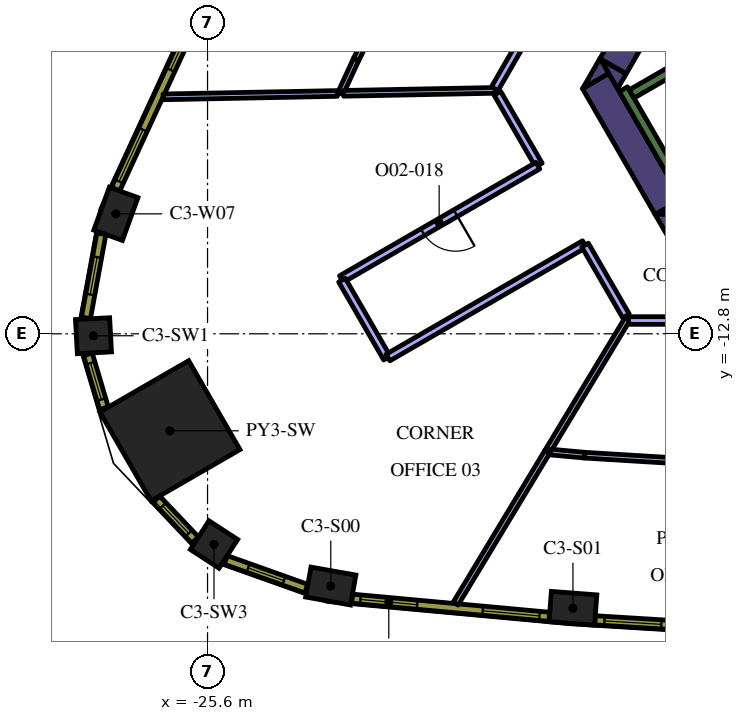
"""IFC4 building model, lengths in metres.
Left out: names, types, materials, properties, quantities, classifications, styles, units other than length and angle.
Written with IfcOpenShell. Run it as: python <this file> out.ifc"""

import sys

from ifc_helpers import new_model, si_unit, direction, frame, frame_2d, origin, origin_2d, place, context, subcontext, project, spatial, polyline, rectangle, outline, extrude, element, fill, save


model = new_model("IFC4")
c1 = context("Model", 3, precision=1e-05, world=origin(), true_north=direction((0.0, 1.0)))
c2 = subcontext(c1, "Body", "Model", "MODEL_VIEW")
j1 = project(units=[si_unit("LENGTHUNIT", "METRE"), si_unit("PLANEANGLEUNIT", "RADIAN")], contexts=[c1])
p1 = place(None, origin())
s1 = spatial("IfcSite", under=j1, at=p1, CompositionType="ELEMENT")
p2 = place(p1, origin())
s2 = spatial("IfcBuilding", under=s1, at=p2, CompositionType="ELEMENT")
p3 = place(p2, frame((0.0, 0.0, 162.6)))
s3 = spatial("IfcBuildingStorey", under=s2, at=p3, CompositionType="ELEMENT", Elevation=162.6)
p4 = place(p3, frame((-26.591, -15.352, 0.0), z_axis=(0.0, 0.0, 1.0), x_axis=(-0.866025403784, -0.5, 0.0)))
e1 = element("IfcColumn", 1, at=p4, inside=s3, PredefinedType="COLUMN", context=c2, shape_type="SweptSolid", body=[
    extrude(rectangle(XDim=2.7, YDim=2.7, at=origin_2d()), origin(), (0.0, 0.0, 1.0), 4.2),
])
for number, where, z_axis, x_axis in (
    (2, (-22.357, -19.437, 0.0), (0.0, 0.0, 1.0), (0.985, -0.175, 0.0)),
    (3, (-15.985, -20.022, 0.0), (0.0, 0.0, 1.0), (0.997, -0.076, 0.0)),
    (4, (-28.012, -9.644, 0.0), (0.0, 0.0, 1.0), (-0.341, -0.94, 0.0)),
):
    element("IfcColumn", number, at=place(p3, frame(where, z_axis=z_axis, x_axis=x_axis)), inside=s3, PredefinedType="COLUMN", context=c2, shape_type="SweptSolid", body=[
        extrude(rectangle(XDim=1.2, YDim=0.8, at=origin_2d()), origin(), (0.0, 0.0, 1.0), 4.2),
    ])
for number, where, z_axis, x_axis in (
    (5, (-28.601, -12.851, 0.0), (0.0, 0.0, 1.0), (0.053, -0.999, 0.0)),
    (6, (-25.43, -18.344, 0.0), (0.0, 0.0, 1.0), (0.838, -0.546, 0.0)),
):
    element("IfcColumn", number, at=place(p3, frame(where, z_axis=z_axis, x_axis=x_axis)), inside=s3, PredefinedType="COLUMN", context=c2, shape_type="SweptSolid", body=[
        extrude(rectangle(XDim=0.9, YDim=0.9, at=origin_2d()), origin(), (0.0, 0.0, 1.0), 4.2),
    ])
p5 = place(p3, origin())
e7 = element("IfcWall", 7, at=p5, inside=s3, PredefinedType="SOLIDWALL", context=c2, shape_type="SweptSolid", body=[
    extrude(outline(polyline([(-13.828, -9.65), (-13.38, -9.65), (-13.38, -10.426), (-13.828, -9.65)])), origin(), (0.0, 0.0, 1.0), 4.2),
])
p6 = place(p3, frame((-15.387, -6.148, 0.0), z_axis=(0.0, 0.0, 1.0), x_axis=(0.499984020225, -0.866034629516, 0.0)))
e8 = element("IfcWall", 8, at=p6, inside=s3, PredefinedType="SOLIDWALL", context=c2, shape_type="SweptSolid", body=[
    extrude(rectangle(XDim=3.824, YDim=0.8, at=frame_2d((1.912, 0.0))), origin(), (0.0, 0.0, 1.0), 4.2),
])
e9 = element("IfcWall", 9, at=p5, inside=s3, PredefinedType="SOLIDWALL", context=c2, shape_type="SweptSolid", body=[
    extrude(outline(polyline([(-15.042, -5.947), (-15.729, -6.343), (-15.271, -5.55), (-15.042, -5.947)])), origin(), (0.0, 0.0, 1.0), 4.2),
])
e10 = element("IfcWall", 10, at=p5, inside=s3, PredefinedType="SOLIDWALL", context=c2, shape_type="SweptSolid", body=[
    extrude(outline(polyline([(-12.904, -9.65), (-13.8, -9.65), (-13.128, -9.262), (-12.904, -9.65)])), origin(), (0.0, 0.0, 1.0), 4.2),
])
p7 = place(p3, frame((-13.518, -3.314, 0.0), z_axis=(0.0, 0.0, 1.0), x_axis=(-0.499969377405, -0.866043083026, 0.0)))
e11 = element("IfcWall", 11, at=p7, inside=s3, PredefinedType="SOLIDWALL", context=c2, shape_type="SweptSolid", body=[
    extrude(rectangle(XDim=2.824, YDim=0.8, at=frame_2d((1.412, 0.0))), origin(), (0.0, 0.0, 1.0), 4.2),
])
e12 = element("IfcWall", 12, at=p5, inside=s3, PredefinedType="SOLIDWALL", context=c2, shape_type="SweptSolid", body=[
    extrude(outline(polyline([(-14.809, -6.35), (-15.257, -5.574), (-14.585, -5.962), (-14.809, -6.35)])), origin(), (0.0, 0.0, 1.0), 4.2),
])
p8 = place(p3, frame((-12.84, -9.511, 0.0), z_axis=(0.0, 0.0, 1.0), x_axis=(-0.499997733992, 0.866026712061, 0.0)))
e13 = element("IfcWall", 13, at=p8, inside=s3, PredefinedType="SOLIDWALL", context=c2, shape_type="SweptSolid", body=[
    extrude(rectangle(XDim=3.634, YDim=0.25, at=frame_2d((1.817, 0.0))), origin(), (0.0, 0.0, 1.0), 4.2),
])
p9 = place(p3, frame((-14.44, -6.49, 0.0), z_axis=(0.0, 0.0, 1.0), x_axis=(0.866022966069, 0.500004222222, 0.0)))
e14 = element("IfcWall", 14, at=p9, inside=s3, PredefinedType="SOLIDWALL", context=c2, shape_type="SweptSolid", body=[
    extrude(rectangle(XDim=6.8, YDim=0.25, at=frame_2d((3.4, 0.0))), origin(), (0.0, 0.0, 1.0), 4.2),
])
p10 = place(p3, frame((-21.689, -5.579, 0.0), z_axis=(0.0, 0.0, 1.0), x_axis=(0.446219729364, 0.894923434225, 0.0)))
e15 = element("IfcWall", 15, at=p10, inside=s3, PredefinedType="PARTITIONING", context=c2, shape_type="SweptSolid", body=[
    extrude(rectangle(XDim=5.995, YDim=0.15, at=frame_2d((2.998, 0.0))), origin(), (0.0, 0.0, 1.0), 3.15),
])
p11 = place(p10, frame((2.595, 0.0, 0.0)))
e16 = element("IfcOpeningElement", 16, at=p11, cuts=e15, PredefinedType="OPENING", context=c2, shape_type="SweptSolid", body=[
    extrude(rectangle(XDim=0.9, YDim=2.1, at=frame_2d((0.45, 1.05))), frame((0.0, 0.085, 0.0), z_axis=(0.0, -1.0, 0.0), x_axis=(1.0, 0.0, 0.0)), (0.0, 0.0, 1.0), 0.17),
])
p12 = place(p3, frame((-21.689, -5.579, 0.0), z_axis=(0.0, 0.0, 1.0), x_axis=(-0.418649696334, -0.908147802816, 0.0)))
e17 = element("IfcWall", 17, at=p12, inside=s3, PredefinedType="PARTITIONING", context=c2, shape_type="SweptSolid", body=[
    extrude(rectangle(XDim=0.986, YDim=0.15, at=frame_2d((0.493, 0.0))), origin(), (0.0, 0.0, 1.0), 3.15),
])
p13 = place(p3, frame((-22.185, -6.476, 0.0), z_axis=(0.0, 0.0, 1.0), x_axis=(-0.999810025733, -0.019491342784, 0.0)))
e18 = element("IfcWall", 18, at=p13, inside=s3, PredefinedType="PARTITIONING", context=c2, shape_type="SweptSolid", body=[
    extrude(rectangle(XDim=4.584, YDim=0.15, at=frame_2d((2.292, 0.0))), origin(), (0.0, 0.0, 1.0), 3.15),
])
p14 = place(p3, frame((-18.016, -6.395, 0.0), z_axis=(0.0, 0.0, 1.0), x_axis=(-0.999809528944, -0.019516808959, 0.0)))
e19 = element("IfcWall", 19, at=p14, inside=s3, PredefinedType="PARTITIONING", context=c2, shape_type="SweptSolid", body=[
    extrude(rectangle(XDim=4.003, YDim=0.15, at=frame_2d((2.001, 0.0))), origin(), (0.0, 0.0, 1.0), 3.15),
])
p15 = place(p3, frame((-13.047, 2.302, 0.0), z_axis=(0.0, 0.0, 1.0), x_axis=(-0.499986873641, -0.866032982159, 0.0)))
e20 = element("IfcWall", 20, at=p15, inside=s3, PredefinedType="PARTITIONING", context=c2, shape_type="SweptSolid", body=[
    extrude(rectangle(XDim=9.99, YDim=0.2, at=frame_2d((4.995, 0.0))), origin(), (0.0, 0.0, 1.0), 3.15),
])
p16 = place(p15, frame((4.5, 0.0, 0.0)))
e21 = element("IfcOpeningElement", 21, at=p16, cuts=e20, PredefinedType="OPENING", context=c2, shape_type="SweptSolid", body=[
    extrude(rectangle(XDim=1.0, YDim=2.1, at=frame_2d((0.5, 1.05))), frame((0.0, 0.11, 0.0), z_axis=(0.0, -1.0, 0.0), x_axis=(1.0, 0.0, 0.0)), (0.0, 0.0, 1.0), 0.22),
])
p17 = place(p3, frame((-16.656, -15.9, 0.0), z_axis=(0.0, 0.0, 1.0), x_axis=(-0.516845255261, -0.856078841062, 0.0)))
e22 = element("IfcWall", 22, at=p17, inside=s3, PredefinedType="PARTITIONING", context=c2, shape_type="SweptSolid", body=[
    extrude(rectangle(XDim=4.672, YDim=0.15, at=frame_2d((2.336, 0.0))), origin(), (0.0, 0.0, 1.0), 3.15),
])
p18 = place(p3, frame((-14.546, -12.406, 0.0), z_axis=(0.0, 0.0, 1.0), x_axis=(-0.516811321583, -0.856099327113, 0.0)))
e23 = element("IfcWall", 23, at=p18, inside=s3, PredefinedType="PARTITIONING", context=c2, shape_type="SweptSolid", body=[
    extrude(rectangle(XDim=4.09, YDim=0.15, at=frame_2d((2.045, 0.0))), origin(), (0.0, 0.0, 1.0), 3.15),
])
p19 = place(p3, frame((-17.974, -6.469, 0.0), z_axis=(0.0, 0.0, 1.0), x_axis=(0.499961062019, -0.866047883471, 0.0)))
e24 = element("IfcWall", 24, at=p19, inside=s3, PredefinedType="PARTITIONING", context=c2, shape_type="SweptSolid", body=[
    extrude(rectangle(XDim=2.185, YDim=0.2, at=frame_2d((1.092, 0.0))), origin(), (0.0, 0.0, 1.0), 3.15),
])
p20 = place(p3, frame((-16.907, -8.376, 0.0), z_axis=(0.0, 0.0, 1.0), x_axis=(-0.866017375886, -0.50001390447, 0.0)))
e25 = element("IfcWall", 25, at=p20, inside=s3, PredefinedType="PARTITIONING", context=c2, shape_type="SweptSolid", body=[
    extrude(rectangle(XDim=5.97, YDim=0.2, at=frame_2d((2.985, 0.0))), origin(), (0.0, 0.0, 1.0), 3.15),
])
p21 = place(p20, frame((2.5, 0.0, 0.0)))
e26 = element("IfcOpeningElement", 26, at=p21, cuts=e25, PredefinedType="OPENING", context=c2, shape_type="SweptSolid", body=[
    extrude(rectangle(XDim=1.0, YDim=2.1, at=frame_2d((0.5, 1.05))), frame((0.0, 0.11, 0.0), z_axis=(0.0, -1.0, 0.0), x_axis=(1.0, 0.0, 0.0)), (0.0, 0.0, 1.0), 0.22),
])
p22 = place(p3, frame((-22.062, -11.387, 0.0), z_axis=(0.0, 0.0, 1.0), x_axis=(0.5000167099, -0.866015756104, 0.0)))
e27 = element("IfcWall", 27, at=p22, inside=s3, PredefinedType="PARTITIONING", context=c2, shape_type="SweptSolid", body=[
    extrude(rectangle(XDim=2.37, YDim=0.2, at=frame_2d((1.185, 0.0))), origin(), (0.0, 0.0, 1.0), 3.15),
])
p23 = place(p3, frame((-20.851, -13.424, 0.0), z_axis=(0.0, 0.0, 1.0), x_axis=(0.866007151214, 0.500031613047, 0.0)))
e28 = element("IfcWall", 28, at=p23, inside=s3, PredefinedType="PARTITIONING", context=c2, shape_type="SweptSolid", body=[
    extrude(rectangle(XDim=5.97, YDim=0.2, at=frame_2d((2.985, 0.0))), origin(), (0.0, 0.0, 1.0), 3.15),
])
p24 = place(p3, frame((-15.666, -10.465, 0.0), z_axis=(0.0, 0.0, 1.0), x_axis=(0.499977443261, -0.866038426532, 0.0)))
e29 = element("IfcWall", 29, at=p24, inside=s3, PredefinedType="PARTITIONING", context=c2, shape_type="SweptSolid", body=[
    extrude(rectangle(XDim=2.155, YDim=0.2, at=frame_2d((1.077, 0.0))), origin(), (0.0, 0.0, 1.0), 3.15),
])
p25 = place(p3, frame((-16.575, -15.911, 0.0), z_axis=(0.0, 0.0, 1.0), x_axis=(0.995808489615, -0.09146284497, 0.0)))
e30 = element("IfcWall", 30, at=p25, inside=s3, PredefinedType="PARTITIONING", context=c2, shape_type="SweptSolid", body=[
    extrude(rectangle(XDim=0.902, YDim=0.15, at=frame_2d((0.451, 0.0))), origin(), (0.0, 0.0, 1.0), 3.15),
])
p26 = place(p3, frame((-9.692, -16.36, 0.0), z_axis=(0.0, 0.0, 1.0), x_axis=(-0.998135339661, 0.061039689709, 0.0)))
e31 = element("IfcWall", 31, at=p26, inside=s3, PredefinedType="PARTITIONING", context=c2, shape_type="SweptSolid", body=[
    extrude(rectangle(XDim=5.996, YDim=0.15, at=frame_2d((2.998, 0.0))), origin(), (0.0, 0.0, 1.0), 3.15),
])
p27 = place(p26, frame((2.595, 0.0, 0.0)))
e32 = element("IfcOpeningElement", 32, at=p27, cuts=e31, PredefinedType="OPENING", context=c2, shape_type="SweptSolid", body=[
    extrude(rectangle(XDim=0.9, YDim=2.1, at=frame_2d((0.45, 1.05))), frame((0.0, 0.085, 0.0), z_axis=(0.0, -1.0, 0.0), x_axis=(1.0, 0.0, 0.0)), (0.0, 0.0, 1.0), 0.17),
])
p28 = place(p3, frame((-14.521, -12.45, 0.0), z_axis=(0.0, 0.0, 1.0), x_axis=(1.0, 0.0, 0.0)))
e33 = element("IfcWall", 33, at=p28, inside=s3, PredefinedType="PARTITIONING", context=c2, shape_type="SweptSolid", body=[
    extrude(rectangle(XDim=9.99, YDim=0.2, at=frame_2d((4.995, 0.0))), origin(), (0.0, 0.0, 1.0), 3.15),
])
p29 = place(p28, frame((4.5, 0.0, 0.0)))
e34 = element("IfcOpeningElement", 34, at=p29, cuts=e33, PredefinedType="OPENING", context=c2, shape_type="SweptSolid", body=[
    extrude(rectangle(XDim=1.0, YDim=2.1, at=frame_2d((0.5, 1.05))), frame((0.0, 0.11, 0.0), z_axis=(0.0, -1.0, 0.0), x_axis=(1.0, 0.0, 0.0)), (0.0, 0.0, 1.0), 0.22),
])
p30 = place(p3, frame((-21.797, -19.77, 0.0), z_axis=(0.0, 0.0, 1.0), x_axis=(0.995808712151, -0.091460422067, 0.0)))
e35 = element("IfcWall", 35, at=p30, inside=s3, PredefinedType="SOLIDWALL", context=c2, shape_type="SweptSolid", body=[
    extrude(rectangle(XDim=5.213, YDim=0.24, at=frame_2d((2.606, 0.0))), origin(), (0.0, 0.0, 1.0), 3.95),
])
p31 = place(p30, frame((0.221, 0.0, 0.9)))
e36 = element("IfcOpeningElement", 36, at=p31, cuts=e35, PredefinedType="OPENING", context=c2, shape_type="SweptSolid", body=[
    extrude(rectangle(XDim=1.5, YDim=2.55, at=frame_2d((0.75, 1.275))), frame((0.0, 0.13, 0.0), z_axis=(0.0, -1.0, 0.0), x_axis=(1.0, 0.0, 0.0)), (0.0, 0.0, 1.0), 0.26),
])
p32 = place(p30, frame((3.452, 0.0, 0.9)))
e37 = element("IfcOpeningElement", 37, at=p32, cuts=e35, PredefinedType="OPENING", context=c2, shape_type="SweptSolid", body=[
    extrude(rectangle(XDim=1.5, YDim=2.55, at=frame_2d((0.75, 1.275))), frame((0.0, 0.13, 0.0), z_axis=(0.0, -1.0, 0.0), x_axis=(1.0, 0.0, 0.0)), (0.0, 0.0, 1.0), 0.26),
])
p33 = place(p3, frame((-15.405, -20.338, 0.0), z_axis=(0.0, 0.0, 1.0), x_axis=(0.998135294646, -0.061040425794, 0.0)))
e38 = element("IfcWall", 38, at=p33, inside=s3, PredefinedType="SOLIDWALL", context=c2, shape_type="SweptSolid", body=[
    extrude(rectangle(XDim=5.204, YDim=0.24, at=frame_2d((2.602, 0.0))), origin(), (0.0, 0.0, 1.0), 3.95),
])
p34 = place(p33, frame((0.248, 0.0, 0.9)))
e39 = element("IfcOpeningElement", 39, at=p34, cuts=e38, PredefinedType="OPENING", context=c2, shape_type="SweptSolid", body=[
    extrude(rectangle(XDim=1.5, YDim=2.55, at=frame_2d((0.75, 1.275))), frame((0.0, 0.13, 0.0), z_axis=(0.0, -1.0, 0.0), x_axis=(1.0, 0.0, 0.0)), (0.0, 0.0, 1.0), 0.26),
])
p35 = place(p33, frame((3.455, 0.0, 0.9)))
e40 = element("IfcOpeningElement", 40, at=p35, cuts=e38, PredefinedType="OPENING", context=c2, shape_type="SweptSolid", body=[
    extrude(rectangle(XDim=1.5, YDim=2.55, at=frame_2d((0.75, 1.275))), frame((0.0, 0.13, 0.0), z_axis=(0.0, -1.0, 0.0), x_axis=(1.0, 0.0, 0.0)), (0.0, 0.0, 1.0), 0.26),
])
p36 = place(p3, frame((-25.837, -4.258, 0.0), z_axis=(0.0, 0.0, 1.0), x_axis=(-0.418722559465, -0.908114209885, 0.0)))
e41 = element("IfcWall", 41, at=p36, inside=s3, PredefinedType="SOLIDWALL", context=c2, shape_type="SweptSolid", body=[
    extrude(rectangle(XDim=5.213, YDim=0.24, at=frame_2d((2.606, 0.0))), origin(), (0.0, 0.0, 1.0), 3.95),
])
p37 = place(p36, frame((0.261, 0.0, 0.9)))
e42 = element("IfcOpeningElement", 42, at=p37, cuts=e41, PredefinedType="OPENING", context=c2, shape_type="SweptSolid", body=[
    extrude(rectangle(XDim=1.5, YDim=2.55, at=frame_2d((0.75, 1.275))), frame((0.0, 0.13, 0.0), z_axis=(0.0, -1.0, 0.0), x_axis=(1.0, 0.0, 0.0)), (0.0, 0.0, 1.0), 0.26),
])
p38 = place(p36, frame((3.492, 0.0, 0.9)))
e43 = element("IfcOpeningElement", 43, at=p38, cuts=e41, PredefinedType="OPENING", context=c2, shape_type="SweptSolid", body=[
    extrude(rectangle(XDim=1.5, YDim=2.55, at=frame_2d((0.75, 1.275))), frame((0.0, 0.13, 0.0), z_axis=(0.0, -1.0, 0.0), x_axis=(1.0, 0.0, 0.0)), (0.0, 0.0, 1.0), 0.26),
])
p39 = place(p3, frame((-28.393, -10.167, 0.0), z_axis=(0.0, 0.0, 1.0), x_axis=(-0.180737189259, -0.983531427265, 0.0)))
e44 = element("IfcWall", 44, at=p39, inside=s3, PredefinedType="SOLIDWALL", context=c2, shape_type="SweptSolid", body=[
    extrude(rectangle(XDim=2.25, YDim=0.24, at=frame_2d((1.125, 0.0))), origin(), (0.0, 0.0, 1.0), 3.95),
])
p40 = place(p39, frame((0.625, 0.0, 0.9)))
e45 = element("IfcOpeningElement", 45, at=p40, cuts=e44, PredefinedType="OPENING", context=c2, shape_type="SweptSolid", body=[
    extrude(rectangle(XDim=1.0, YDim=2.55, at=frame_2d((0.5, 1.275))), frame((0.0, 0.13, 0.0), z_axis=(0.0, -1.0, 0.0), x_axis=(1.0, 0.0, 0.0)), (0.0, 0.0, 1.0), 0.26),
])
p41 = place(p3, frame((-28.748, -13.34, 0.0), z_axis=(0.0, 0.0, 1.0), x_axis=(0.284413721403, -0.958701640281, 0.0)))
e46 = element("IfcWall", 46, at=p41, inside=s3, PredefinedType="SOLIDWALL", context=c2, shape_type="SweptSolid", body=[
    extrude(rectangle(XDim=1.482, YDim=0.24, at=frame_2d((0.741, 0.0))), origin(), (0.0, 0.0, 1.0), 3.95),
])
p42 = place(p41, frame((0.241, 0.0, 0.9)))
e47 = element("IfcOpeningElement", 47, at=p42, cuts=e46, PredefinedType="OPENING", context=c2, shape_type="SweptSolid", body=[
    extrude(rectangle(XDim=1.0, YDim=2.55, at=frame_2d((0.5, 1.275))), frame((0.0, 0.13, 0.0), z_axis=(0.0, -1.0, 0.0), x_axis=(1.0, 0.0, 0.0)), (0.0, 0.0, 1.0), 0.26),
])
p43 = place(p3, frame((-26.946, -17.151, 0.0), z_axis=(0.0, 0.0, 1.0), x_axis=(0.687986858937, -0.725723144133, 0.0)))
e48 = element("IfcWall", 48, at=p43, inside=s3, PredefinedType="SOLIDWALL", context=c2, shape_type="SweptSolid", body=[
    extrude(rectangle(XDim=1.481, YDim=0.24, at=frame_2d((0.741, 0.0))), origin(), (0.0, 0.0, 1.0), 3.95),
])
p44 = place(p43, frame((0.241, 0.0, 0.9)))
e49 = element("IfcOpeningElement", 49, at=p44, cuts=e48, PredefinedType="OPENING", context=c2, shape_type="SweptSolid", body=[
    extrude(rectangle(XDim=1.0, YDim=2.55, at=frame_2d((0.5, 1.275))), frame((0.0, 0.13, 0.0), z_axis=(0.0, -1.0, 0.0), x_axis=(1.0, 0.0, 0.0)), (0.0, 0.0, 1.0), 0.26),
])
p45 = place(p3, frame((-25.121, -18.751, 0.0), z_axis=(0.0, 0.0, 1.0), x_axis=(0.942099727267, -0.335332825539, 0.0)))
e50 = element("IfcWall", 50, at=p45, inside=s3, PredefinedType="SOLIDWALL", context=c2, shape_type="SweptSolid", body=[
    extrude(rectangle(XDim=2.25, YDim=0.24, at=frame_2d((1.125, 0.0))), origin(), (0.0, 0.0, 1.0), 3.95),
])
p46 = place(p45, frame((0.625, 0.0, 0.9)))
e51 = element("IfcOpeningElement", 51, at=p46, cuts=e50, PredefinedType="OPENING", context=c2, shape_type="SweptSolid", body=[
    extrude(rectangle(XDim=1.0, YDim=2.55, at=frame_2d((0.5, 1.275))), frame((0.0, 0.13, 0.0), z_axis=(0.0, -1.0, 0.0), x_axis=(1.0, 0.0, 0.0)), (0.0, 0.0, 1.0), 0.26),
])
p47 = place(p21, origin())
e52 = element("IfcDoor", 52, at=p47, inside=s3, OperationType="SINGLE_SWING_RIGHT", PredefinedType="DOOR", context=c2, shape_type="SweptSolid", body=[
    extrude(rectangle(XDim=1.0, YDim=2.1, at=frame_2d((0.5, 1.05))), frame((0.0, 0.025, 0.0), z_axis=(0.0, -1.0, 0.0), x_axis=(1.0, 0.0, 0.0)), (0.0, 0.0, 1.0), 0.05),
])
fill(e26, e52)
p48 = place(p31, origin())
e53 = element("IfcWindow", 53, at=p48, inside=s3, PartitioningType="SINGLE_PANEL", PredefinedType="WINDOW", context=c2, shape_type="SweptSolid", body=[
    extrude(rectangle(XDim=1.5, YDim=2.55, at=frame_2d((0.75, 1.275))), frame((0.0, 0.04, 0.0), z_axis=(0.0, -1.0, 0.0), x_axis=(1.0, 0.0, 0.0)), (0.0, 0.0, 1.0), 0.06),
])
fill(e36, e53)
p49 = place(p32, origin())
e54 = element("IfcWindow", 54, at=p49, inside=s3, PartitioningType="SINGLE_PANEL", PredefinedType="WINDOW", context=c2, shape_type="SweptSolid", body=[
    extrude(rectangle(XDim=1.5, YDim=2.55, at=frame_2d((0.75, 1.275))), frame((0.0, 0.04, 0.0), z_axis=(0.0, -1.0, 0.0), x_axis=(1.0, 0.0, 0.0)), (0.0, 0.0, 1.0), 0.06),
])
fill(e37, e54)
p50 = place(p34, origin())
e55 = element("IfcWindow", 55, at=p50, inside=s3, PartitioningType="SINGLE_PANEL", PredefinedType="WINDOW", context=c2, shape_type="SweptSolid", body=[
    extrude(rectangle(XDim=1.5, YDim=2.55, at=frame_2d((0.75, 1.275))), frame((0.0, 0.04, 0.0), z_axis=(0.0, -1.0, 0.0), x_axis=(1.0, 0.0, 0.0)), (0.0, 0.0, 1.0), 0.06),
])
fill(e39, e55)
p51 = place(p37, origin())
e56 = element("IfcWindow", 56, at=p51, inside=s3, PartitioningType="SINGLE_PANEL", PredefinedType="WINDOW", context=c2, shape_type="SweptSolid", body=[
    extrude(rectangle(XDim=1.5, YDim=2.55, at=frame_2d((0.75, 1.275))), frame((0.0, 0.04, 0.0), z_axis=(0.0, -1.0, 0.0), x_axis=(1.0, 0.0, 0.0)), (0.0, 0.0, 1.0), 0.06),
])
fill(e42, e56)
p52 = place(p38, origin())
e57 = element("IfcWindow", 57, at=p52, inside=s3, PartitioningType="SINGLE_PANEL", PredefinedType="WINDOW", context=c2, shape_type="SweptSolid", body=[
    extrude(rectangle(XDim=1.5, YDim=2.55, at=frame_2d((0.75, 1.275))), frame((0.0, 0.04, 0.0), z_axis=(0.0, -1.0, 0.0), x_axis=(1.0, 0.0, 0.0)), (0.0, 0.0, 1.0), 0.06),
])
fill(e43, e57)
p53 = place(p40, origin())
e58 = element("IfcWindow", 58, at=p53, inside=s3, PartitioningType="SINGLE_PANEL", PredefinedType="WINDOW", context=c2, shape_type="SweptSolid", body=[
    extrude(rectangle(XDim=1.0, YDim=2.55, at=frame_2d((0.5, 1.275))), frame((0.0, 0.04, 0.0), z_axis=(0.0, -1.0, 0.0), x_axis=(1.0, 0.0, 0.0)), (0.0, 0.0, 1.0), 0.06),
])
fill(e45, e58)
p54 = place(p42, origin())
e59 = element("IfcWindow", 59, at=p54, inside=s3, PartitioningType="SINGLE_PANEL", PredefinedType="WINDOW", context=c2, shape_type="SweptSolid", body=[
    extrude(rectangle(XDim=1.0, YDim=2.55, at=frame_2d((0.5, 1.275))), frame((0.0, 0.04, 0.0), z_axis=(0.0, -1.0, 0.0), x_axis=(1.0, 0.0, 0.0)), (0.0, 0.0, 1.0), 0.06),
])
fill(e47, e59)
p55 = place(p44, origin())
e60 = element("IfcWindow", 60, at=p55, inside=s3, PartitioningType="SINGLE_PANEL", PredefinedType="WINDOW", context=c2, shape_type="SweptSolid", body=[
    extrude(rectangle(XDim=1.0, YDim=2.55, at=frame_2d((0.5, 1.275))), frame((0.0, 0.04, 0.0), z_axis=(0.0, -1.0, 0.0), x_axis=(1.0, 0.0, 0.0)), (0.0, 0.0, 1.0), 0.06),
])
fill(e49, e60)
p56 = place(p46, origin())
e61 = element("IfcWindow", 61, at=p56, inside=s3, PartitioningType="SINGLE_PANEL", PredefinedType="WINDOW", context=c2, shape_type="SweptSolid", body=[
    extrude(rectangle(XDim=1.0, YDim=2.55, at=frame_2d((0.5, 1.275))), frame((0.0, 0.04, 0.0), z_axis=(0.0, -1.0, 0.0), x_axis=(1.0, 0.0, 0.0)), (0.0, 0.0, 1.0), 0.06),
])
fill(e51, e61)
save(model, sys.argv[1])
